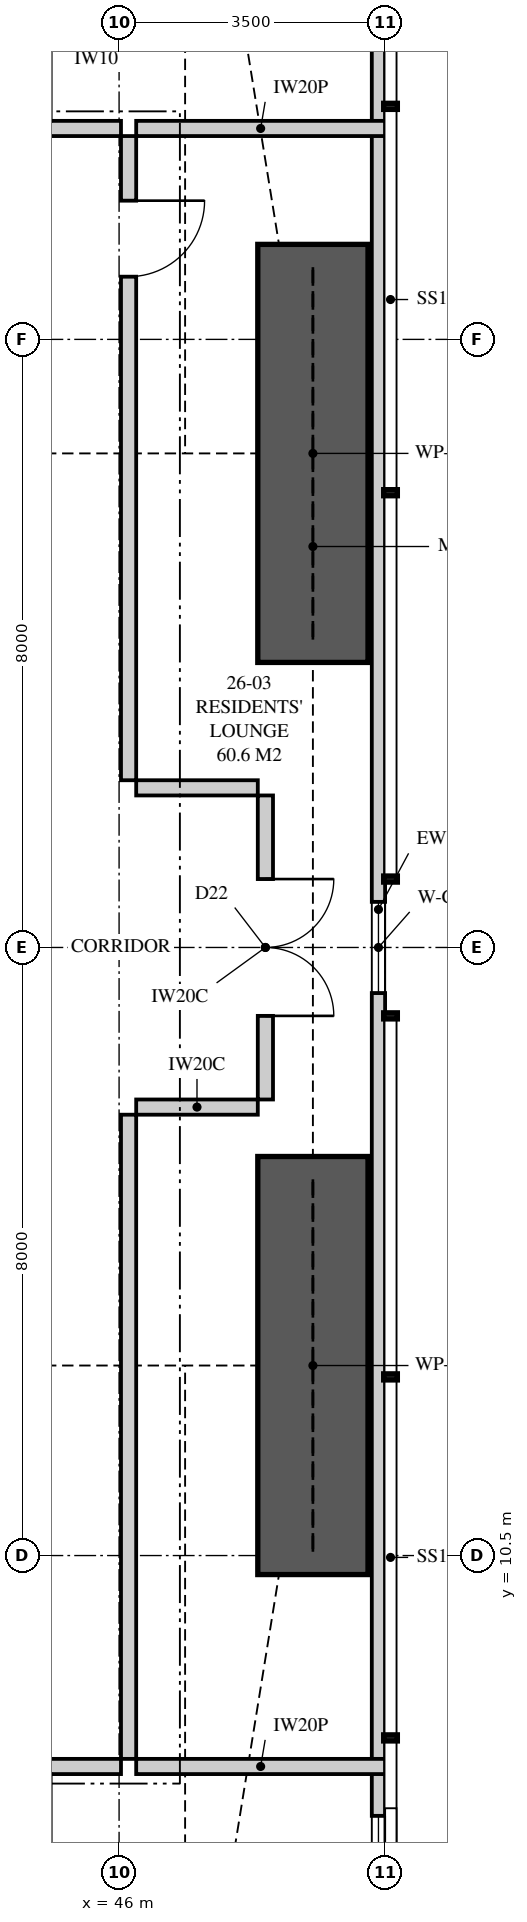
"""IFC4 building model, lengths in metres.
Left out: names, types, materials, properties, quantities, classifications, styles, units other than length and angle.
Written with IfcOpenShell. Run it as: python <this file> out.ifc"""

import sys

from ifc_helpers import new_model, si_unit, direction, frame, frame_2d, origin, place, context, subcontext, project, spatial, polyline, rectangle, outline, extrude, element, fill, save


model = new_model("IFC4")
c1 = context("Model", 3, precision=1e-05, world=origin(), true_north=direction((0.0, 1.0)))
c2 = subcontext(c1, "Body", "Model", "MODEL_VIEW")
j1 = project(units=[si_unit("LENGTHUNIT", "METRE"), si_unit("PLANEANGLEUNIT", "RADIAN")], contexts=[c1])
p1 = place(None, origin())
s1 = spatial("IfcSite", under=j1, at=p1, CompositionType="ELEMENT")
p2 = place(p1, origin())
s2 = spatial("IfcBuilding", under=s1, at=p2, CompositionType="ELEMENT")
p3 = place(p2, frame((0.0, 0.0, 98.15)))
s3 = spatial("IfcBuildingStorey", under=s2, at=p3, CompositionType="ELEMENT", Elevation=98.15)
p4 = place(p3, frame((49.413, 3.051, 0.0), z_axis=(0.0, 0.0, 1.0), x_axis=(0.0, 1.0, 0.0)))
e1 = element("IfcWall", 1, at=p4, inside=s3, PredefinedType="SOLIDWALL", context=c2, shape_type="SweptSolid", body=[
    extrude(outline(polyline([(0.0, 0.0), (31.897, 0.0), (31.897, 3.11), (22.167, 3.11), (22.167, 2.15), (22.074, 2.15), (22.074, 3.11), (21.949, 3.11), (21.949, 2.15), (9.949, 2.15), (9.949, 3.11), (9.823, 3.11), (9.823, 2.15), (9.73, 2.15), (9.73, 3.11), (0.0, 3.11), (0.0, 0.0)])), frame((0.0, 0.087, 0.0), z_axis=(0.0, -1.0, 0.0), x_axis=(1.0, 0.0, 0.0)), (0.0, 0.0, 1.0), 0.175),
])
p5 = place(p4, frame((2.224, 0.0, 0.4)))
e2 = element("IfcOpeningElement", 2, at=p5, cuts=e1, PredefinedType="OPENING", context=c2, shape_type="SweptSolid", body=[
    extrude(rectangle(XDim=1.8, YDim=1.7, at=frame_2d((0.9, 0.85))), frame((0.0, 0.097, 0.0), z_axis=(0.0, -1.0, 0.0), x_axis=(1.0, 0.0, 0.0)), (0.0, 0.0, 1.0), 0.195),
])
p6 = place(p4, frame((14.849, 0.0, 0.4)))
e3 = element("IfcOpeningElement", 3, at=p6, cuts=e1, PredefinedType="OPENING", context=c2, shape_type="SweptSolid", body=[
    extrude(rectangle(XDim=1.2, YDim=1.7, at=frame_2d((0.6, 0.85))), frame((0.0, 0.097, 0.0), z_axis=(0.0, -1.0, 0.0), x_axis=(1.0, 0.0, 0.0)), (0.0, 0.0, 1.0), 0.195),
])
p7 = place(p4, frame((27.373, 0.0, 0.4)))
e4 = element("IfcOpeningElement", 4, at=p7, cuts=e1, PredefinedType="OPENING", context=c2, shape_type="SweptSolid", body=[
    extrude(rectangle(XDim=1.8, YDim=1.7, at=frame_2d((0.9, 0.85))), frame((0.0, 0.097, 0.0), z_axis=(0.0, -1.0, 0.0), x_axis=(1.0, 0.0, 0.0)), (0.0, 0.0, 1.0), 0.195),
])
p8 = place(p3, frame((36.55, 7.725, 0.0), z_axis=(0.0, 0.0, 1.0), x_axis=(1.0, 0.0, 0.0)))
e5 = element("IfcWall", 5, at=p8, inside=s3, PredefinedType="PARTITIONING", context=c2, shape_type="SweptSolid", body=[
    extrude(outline(polyline([(0.0, 0.0), (9.475, 0.0), (9.475, 3.11), (2.412, 3.11), (2.412, 2.541), (1.738, 2.541), (1.738, 3.11), (0.0, 3.11), (0.0, 0.0)])), frame((0.0, 0.1, 0.0), z_axis=(0.0, -1.0, 0.0), x_axis=(1.0, 0.0, 0.0)), (0.0, 0.0, 1.0), 0.2),
])
p9 = place(p8, frame((2.4, 0.0, 0.0)))
e6 = element("IfcOpeningElement", 6, at=p9, cuts=e5, PredefinedType="OPENING", context=c2, shape_type="SweptSolid", body=[
    extrude(rectangle(XDim=1.05, YDim=2.2, at=frame_2d((0.525, 1.1))), frame((0.0, 0.11, 0.0), z_axis=(0.0, -1.0, 0.0), x_axis=(1.0, 0.0, 0.0)), (0.0, 0.0, 1.0), 0.22),
])
p10 = place(p3, frame((46.225, 7.725, 0.0), z_axis=(0.0, 0.0, 1.0), x_axis=(1.0, 0.0, 0.0)))
e7 = element("IfcWall", 7, at=p10, inside=s3, PredefinedType="PARTITIONING", context=c2, shape_type="SweptSolid", body=[
    extrude(outline(polyline([(0.0, 0.0), (3.275, 0.0), (3.275, 3.11), (2.392, 3.11), (2.392, 2.15), (0.643, 2.15), (0.643, 2.541), (0.306, 2.541), (0.306, 3.11), (0.0, 3.11), (0.0, 0.0)])), frame((0.0, 0.1, 0.0), z_axis=(0.0, -1.0, 0.0), x_axis=(1.0, 0.0, 0.0)), (0.0, 0.0, 1.0), 0.2),
])
p11 = place(p3, frame((36.9, 29.275, 0.0), z_axis=(0.0, 0.0, 1.0), x_axis=(1.0, 0.0, 0.0)))
e8 = element("IfcWall", 8, at=p11, inside=s3, PredefinedType="PARTITIONING", context=c2, shape_type="SweptSolid", body=[
    extrude(outline(polyline([(0.0, 0.0), (9.125, 0.0), (9.125, 3.11), (2.062, 3.11), (2.062, 2.541), (1.388, 2.541), (1.388, 3.11), (0.0, 3.11), (0.0, 0.0)])), frame((0.0, 0.1, 0.0), z_axis=(0.0, -1.0, 0.0), x_axis=(1.0, 0.0, 0.0)), (0.0, 0.0, 1.0), 0.2),
])
p12 = place(p11, frame((4.5, 0.0, 0.0)))
e9 = element("IfcOpeningElement", 9, at=p12, cuts=e8, PredefinedType="OPENING", context=c2, shape_type="SweptSolid", body=[
    extrude(rectangle(XDim=1.05, YDim=2.2, at=frame_2d((0.525, 1.1))), frame((0.0, 0.11, 0.0), z_axis=(0.0, -1.0, 0.0), x_axis=(1.0, 0.0, 0.0)), (0.0, 0.0, 1.0), 0.22),
])
p13 = place(p3, frame((46.225, 29.275, 0.0), z_axis=(0.0, 0.0, 1.0), x_axis=(1.0, 0.0, 0.0)))
e10 = element("IfcWall", 10, at=p13, inside=s3, PredefinedType="PARTITIONING", context=c2, shape_type="SweptSolid", body=[
    extrude(outline(polyline([(0.0, 0.0), (3.275, 0.0), (3.275, 3.11), (2.554, 3.11), (2.554, 2.15), (0.805, 2.15), (0.805, 2.541), (0.306, 2.541), (0.306, 3.11), (0.0, 3.11), (0.0, 0.0)])), frame((0.0, 0.1, 0.0), z_axis=(0.0, -1.0, 0.0), x_axis=(1.0, 0.0, 0.0)), (0.0, 0.0, 1.0), 0.2),
])
p14 = place(p3, frame((46.125, 7.825, 0.0), z_axis=(0.0, 0.0, 1.0), x_axis=(0.0, 1.0, 0.0)))
e11 = element("IfcWall", 11, at=p14, inside=s3, PredefinedType="PARTITIONING", context=c2, shape_type="SweptSolid", body=[
    extrude(outline(polyline([(0.0, 0.0), (8.475, 0.0), (8.475, 3.11), (5.512, 3.11), (5.512, 2.541), (4.838, 2.541), (4.838, 3.11), (0.0, 3.11), (0.0, 0.0)])), frame((0.0, 0.1, 0.0), z_axis=(0.0, -1.0, 0.0), x_axis=(1.0, 0.0, 0.0)), (0.0, 0.0, 1.0), 0.2),
])
p15 = place(p3, frame((46.125, 20.7, 0.0), z_axis=(0.0, 0.0, 1.0), x_axis=(0.0, 1.0, 0.0)))
e12 = element("IfcWall", 12, at=p15, inside=s3, PredefinedType="PARTITIONING", context=c2, shape_type="SweptSolid", body=[
    extrude(outline(polyline([(0.0, 0.0), (8.475, 0.0), (8.475, 3.11), (4.637, 3.11), (4.637, 2.541), (3.963, 2.541), (3.963, 3.11), (0.0, 3.11), (0.0, 0.0)])), frame((0.0, 0.1, 0.0), z_axis=(0.0, -1.0, 0.0), x_axis=(1.0, 0.0, 0.0)), (0.0, 0.0, 1.0), 0.2),
])
p16 = place(p15, frame((6.625, 0.0, 0.0)))
e13 = element("IfcOpeningElement", 13, at=p16, cuts=e12, PredefinedType="OPENING", context=c2, shape_type="SweptSolid", body=[
    extrude(rectangle(XDim=1.0, YDim=2.1, at=frame_2d((0.5, 1.05))), frame((0.0, 0.11, 0.0), z_axis=(0.0, -1.0, 0.0), x_axis=(1.0, 0.0, 0.0)), (0.0, 0.0, 1.0), 0.22),
])
p17 = place(p3, frame((47.925, 16.5, 0.0), z_axis=(0.0, 0.0, 1.0), x_axis=(0.0, 1.0, 0.0)))
e14 = element("IfcWall", 14, at=p17, inside=s3, PredefinedType="PARTITIONING", context=c2, shape_type="SweptSolid", body=[
    extrude(outline(polyline([(0.0, 0.0), (4.0, 0.0), (4.0, 3.11), (4.0, 2.15), (0.0, 2.15), (0.0, 3.11), (0.0, 0.0)])), frame((0.0, 0.1, 0.0), z_axis=(0.0, -1.0, 0.0), x_axis=(1.0, 0.0, 0.0)), (0.0, 0.0, 1.0), 0.2),
])
p18 = place(p17, frame((1.1, 0.0, 0.0)))
e15 = element("IfcOpeningElement", 15, at=p18, cuts=e14, PredefinedType="OPENING", context=c2, shape_type="SweptSolid", body=[
    extrude(rectangle(XDim=1.8, YDim=2.1, at=frame_2d((0.9, 1.05))), frame((0.0, 0.11, 0.0), z_axis=(0.0, -1.0, 0.0), x_axis=(1.0, 0.0, 0.0)), (0.0, 0.0, 1.0), 0.22),
])
for number, where, z_axis, x_axis in (
    (16, (46.225, 16.4, 0.0), (0.0, 0.0, 1.0), (1.0, 0.0, 0.0)),
    (17, (46.225, 20.6, 0.0), (0.0, 0.0, 1.0), (1.0, 0.0, 0.0)),
):
    element("IfcWall", number, at=place(p3, frame(where, z_axis=z_axis, x_axis=x_axis)), inside=s3, PredefinedType="PARTITIONING", context=c2, shape_type="SweptSolid", body=[
        extrude(outline(polyline([(0.0, 0.0), (1.6, 0.0), (1.6, 3.11), (1.6, 2.15), (1.415, 2.15), (1.415, 3.11), (0.0, 3.11), (0.0, 0.0)])), frame((0.0, 0.1, 0.0), z_axis=(0.0, -1.0, 0.0), x_axis=(1.0, 0.0, 0.0)), (0.0, 0.0, 1.0), 0.2),
    ])
for number, where, z_axis, x_axis in (
    (18, (48.55, 10.25, 0.0), (0.0, 0.0, 1.0), (0.0, 1.0, 0.0)),
    (19, (48.55, 22.25, 0.0), (0.0, 0.0, 1.0), (0.0, 1.0, 0.0)),
):
    element("IfcWall", number, at=place(p3, frame(where, z_axis=z_axis, x_axis=x_axis)), inside=s3, PredefinedType="SHEAR", context=c2, shape_type="SweptSolid", body=[
        extrude(rectangle(XDim=5.5, YDim=1.45, at=frame_2d((2.75, 0.0))), origin(), (0.0, 0.0, 1.0), 3.35),
    ])
p19 = place(p5, origin())
e20 = element("IfcWindow", 20, at=p19, inside=s3, PartitioningType="SINGLE_PANEL", PredefinedType="WINDOW", context=c2, shape_type="SweptSolid", body=[
    extrude(rectangle(XDim=1.8, YDim=1.7, at=frame_2d((0.9, 0.85))), frame((0.0, 0.03, 0.0), z_axis=(0.0, -1.0, 0.0), x_axis=(1.0, 0.0, 0.0)), (0.0, 0.0, 1.0), 0.06),
])
fill(e2, e20)
p20 = place(p6, origin())
e21 = element("IfcWindow", 21, at=p20, inside=s3, PartitioningType="SINGLE_PANEL", PredefinedType="WINDOW", context=c2, shape_type="SweptSolid", body=[
    extrude(rectangle(XDim=1.2, YDim=1.7, at=frame_2d((0.6, 0.85))), frame((0.0, 0.03, 0.0), z_axis=(0.0, -1.0, 0.0), x_axis=(1.0, 0.0, 0.0)), (0.0, 0.0, 1.0), 0.06),
])
fill(e3, e21)
p21 = place(p18, frame((1.8, 0.0, 0.0), z_axis=(0.0, 0.0, 1.0), x_axis=(-1.0, 0.0, 0.0)))
e22 = element("IfcDoor", 22, at=p21, inside=s3, OperationType="DOUBLE_DOOR_SINGLE_SWING", PredefinedType="DOOR", context=c2, shape_type="SweptSolid", body=[
    extrude(rectangle(XDim=1.8, YDim=2.1, at=frame_2d((0.9, 1.05))), frame((0.0, 0.025, 0.0), z_axis=(0.0, -1.0, 0.0), x_axis=(1.0, 0.0, 0.0)), (0.0, 0.0, 1.0), 0.05),
])
fill(e15, e22)
p22 = place(p16, frame((1.0, 0.0, 0.0), z_axis=(0.0, 0.0, 1.0), x_axis=(-1.0, 0.0, 0.0)))
e23 = element("IfcDoor", 23, at=p22, inside=s3, OperationType="SINGLE_SWING_LEFT", PredefinedType="DOOR", context=c2, shape_type="SweptSolid", body=[
    extrude(rectangle(XDim=1.0, YDim=2.1, at=frame_2d((0.5, 1.05))), frame((0.0, 0.025, 0.0), z_axis=(0.0, -1.0, 0.0), x_axis=(1.0, 0.0, 0.0)), (0.0, 0.0, 1.0), 0.05),
])
fill(e13, e23)
save(model, sys.argv[1])
